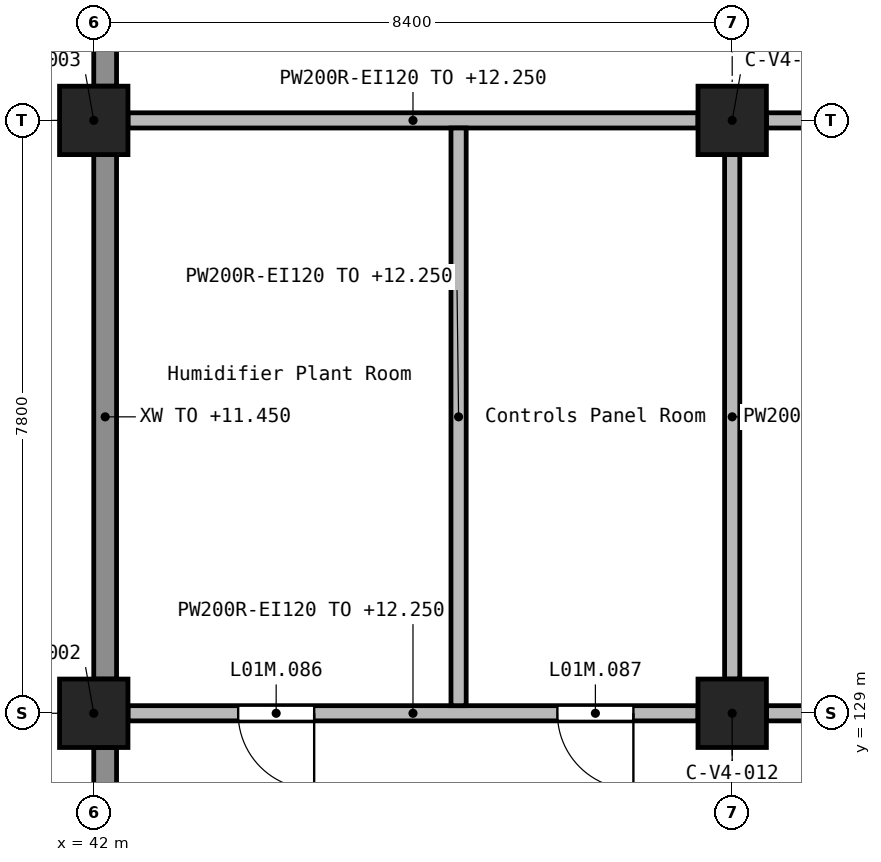
"""IFC4 building model, lengths in metres.
Left out: names, types, materials, properties, quantities, classifications, styles, units other than length and angle.
Written with IfcOpenShell. Run it as: python <this file> out.ifc"""

import sys

from ifc_helpers import new_model, si_unit, direction, frame, frame_2d, origin, origin_2d, place, context, subcontext, project, spatial, rectangle, extrude, element, fill, save


model = new_model("IFC4")
c1 = context("Model", 3, precision=1e-05, world=origin(), true_north=direction((0.0, 1.0)))
c2 = subcontext(c1, "Body", "Model", "MODEL_VIEW")
j1 = project(units=[si_unit("LENGTHUNIT", "METRE"), si_unit("PLANEANGLEUNIT", "RADIAN")], contexts=[c1])
p1 = place(None, origin())
s1 = spatial("IfcSite", under=j1, at=p1, CompositionType="ELEMENT")
p2 = place(p1, origin())
s2 = spatial("IfcBuilding", under=s1, at=p2, CompositionType="ELEMENT")
p3 = place(p2, frame((0.0, 0.0, 9.9)))
s3 = spatial("IfcBuildingStorey", under=s2, at=p3, CompositionType="ELEMENT", Elevation=9.9)
for number, where, z_axis, x_axis in (
    (1, (42.0, 129.0, 0.0), (0.0, 0.0, 1.0), (1.0, 0.0, 0.0)),
    (2, (42.0, 136.8, 0.0), (0.0, 0.0, 1.0), (1.0, 0.0, 0.0)),
    (3, (50.4, 129.0, 0.0), (0.0, 0.0, 1.0), (1.0, 0.0, 0.0)),
    (4, (50.4, 136.8, 0.0), (0.0, 0.0, 1.0), (1.0, 0.0, 0.0)),
):
    element("IfcColumn", number, at=place(p3, frame(where, z_axis=z_axis, x_axis=x_axis)), inside=s3, PredefinedType="COLUMN", context=c2, shape_type="SweptSolid", body=[
        extrude(rectangle(XDim=0.9, YDim=0.9, at=origin_2d()), origin(), (0.0, 0.0, 1.0), 2.7),
    ])
p4 = place(p3, frame((42.15, 139.95, 0.0), z_axis=(0.0, 0.0, 1.0), x_axis=(0.0, -1.0, 0.0)))
e5 = element("IfcWall", 5, at=p4, inside=s3, PredefinedType="STANDARD", context=c2, shape_type="SweptSolid", body=[
    extrude(rectangle(XDim=2.7, YDim=0.3, at=frame_2d((1.35, 0.0))), origin(), (0.0, 0.0, 1.0), 1.55),
])
p5 = place(p3, frame((42.15, 136.35, 0.0), z_axis=(0.0, 0.0, 1.0), x_axis=(0.0, -1.0, 0.0)))
e6 = element("IfcWall", 6, at=p5, inside=s3, PredefinedType="STANDARD", context=c2, shape_type="SweptSolid", body=[
    extrude(rectangle(XDim=6.9, YDim=0.3, at=frame_2d((3.45, 0.0))), origin(), (0.0, 0.0, 1.0), 1.55),
])
p6 = place(p3, frame((42.15, 128.55, 0.0), z_axis=(0.0, 0.0, 1.0), x_axis=(0.0, -1.0, 0.0)))
e7 = element("IfcWall", 7, at=p6, inside=s3, PredefinedType="STANDARD", context=c2, shape_type="SweptSolid", body=[
    extrude(rectangle(XDim=2.7, YDim=0.3, at=frame_2d((1.35, 0.0))), origin(), (0.0, 0.0, 1.0), 1.55),
])
p7 = place(p3, frame((58.35, 129.0, 0.0), z_axis=(0.0, 0.0, 1.0), x_axis=(-1.0, 0.0, 0.0)))
e8 = element("IfcWall", 8, at=p7, inside=s3, PredefinedType="SOLIDWALL", context=c2, shape_type="SweptSolid", body=[
    extrude(rectangle(XDim=7.5, YDim=0.2, at=frame_2d((3.75, 0.0))), origin(), (0.0, 0.0, 1.0), 2.35),
])
p8 = place(p7, frame((1.65, 0.0, 0.0)))
e9 = element("IfcOpeningElement", 9, at=p8, cuts=e8, PredefinedType="OPENING", context=c2, shape_type="SweptSolid", body=[
    extrude(rectangle(XDim=1.8, YDim=2.1, at=frame_2d((0.9, 1.05))), frame((0.0, 0.11, 0.0), z_axis=(0.0, -1.0, 0.0), x_axis=(1.0, 0.0, 0.0)), (0.0, 0.0, 1.0), 0.22),
])
p9 = place(p3, frame((49.95, 129.0, 0.0), z_axis=(0.0, 0.0, 1.0), x_axis=(-1.0, 0.0, 0.0)))
e10 = element("IfcWall", 10, at=p9, inside=s3, PredefinedType="SOLIDWALL", context=c2, shape_type="SweptSolid", body=[
    extrude(rectangle(XDim=7.5, YDim=0.2, at=frame_2d((3.75, 0.0))), origin(), (0.0, 0.0, 1.0), 2.35),
])
p10 = place(p9, frame((5.05, 0.0, 0.0)))
e11 = element("IfcOpeningElement", 11, at=p10, cuts=e10, PredefinedType="OPENING", context=c2, shape_type="SweptSolid", body=[
    extrude(rectangle(XDim=1.0, YDim=2.1, at=frame_2d((0.5, 1.05))), frame((0.0, 0.11, 0.0), z_axis=(0.0, -1.0, 0.0), x_axis=(1.0, 0.0, 0.0)), (0.0, 0.0, 1.0), 0.22),
])
p11 = place(p9, frame((0.85, 0.0, 0.0)))
e12 = element("IfcOpeningElement", 12, at=p11, cuts=e10, PredefinedType="OPENING", context=c2, shape_type="SweptSolid", body=[
    extrude(rectangle(XDim=1.0, YDim=2.1, at=frame_2d((0.5, 1.05))), frame((0.0, 0.11, 0.0), z_axis=(0.0, -1.0, 0.0), x_axis=(1.0, 0.0, 0.0)), (0.0, 0.0, 1.0), 0.22),
])
for number, where, z_axis, x_axis in (
    (13, (58.35, 136.8, 0.0), (0.0, 0.0, 1.0), (-1.0, 0.0, 0.0)),
    (14, (49.95, 136.8, 0.0), (0.0, 0.0, 1.0), (-1.0, 0.0, 0.0)),
):
    element("IfcWall", number, at=place(p3, frame(where, z_axis=z_axis, x_axis=x_axis)), inside=s3, PredefinedType="SOLIDWALL", context=c2, shape_type="SweptSolid", body=[
        extrude(rectangle(XDim=7.5, YDim=0.2, at=frame_2d((3.75, 0.0))), origin(), (0.0, 0.0, 1.0), 2.35),
    ])
p12 = place(p3, frame((46.8, 129.1, 0.0), z_axis=(0.0, 0.0, 1.0), x_axis=(0.0, 1.0, 0.0)))
e15 = element("IfcWall", 15, at=p12, inside=s3, PredefinedType="SOLIDWALL", context=c2, shape_type="SweptSolid", body=[
    extrude(rectangle(XDim=7.6, YDim=0.2, at=frame_2d((3.8, 0.0))), origin(), (0.0, 0.0, 1.0), 2.35),
])
p13 = place(p3, frame((50.4, 129.45, 0.0), z_axis=(0.0, 0.0, 1.0), x_axis=(0.0, 1.0, 0.0)))
e16 = element("IfcWall", 16, at=p13, inside=s3, PredefinedType="SOLIDWALL", context=c2, shape_type="SweptSolid", body=[
    extrude(rectangle(XDim=6.9, YDim=0.2, at=frame_2d((3.45, 0.0))), origin(), (0.0, 0.0, 1.0), 2.35),
])
p14 = place(p10, frame((1.0, 0.0, 0.0), z_axis=(0.0, 0.0, 1.0), x_axis=(-1.0, 0.0, 0.0)))
e17 = element("IfcDoor", 17, at=p14, inside=s3, OperationType="SINGLE_SWING_LEFT", PredefinedType="DOOR", context=c2, shape_type="SweptSolid", body=[
    extrude(rectangle(XDim=1.0, YDim=2.1, at=frame_2d((0.5, 1.05))), frame((0.0, 0.025, 0.0), z_axis=(0.0, -1.0, 0.0), x_axis=(1.0, 0.0, 0.0)), (0.0, 0.0, 1.0), 0.05),
])
fill(e11, e17)
p15 = place(p11, frame((1.0, 0.0, 0.0), z_axis=(0.0, 0.0, 1.0), x_axis=(-1.0, 0.0, 0.0)))
e18 = element("IfcDoor", 18, at=p15, inside=s3, OperationType="SINGLE_SWING_RIGHT", PredefinedType="DOOR", context=c2, shape_type="SweptSolid", body=[
    extrude(rectangle(XDim=1.0, YDim=2.1, at=frame_2d((0.5, 1.05))), frame((0.0, 0.025, 0.0), z_axis=(0.0, -1.0, 0.0), x_axis=(1.0, 0.0, 0.0)), (0.0, 0.0, 1.0), 0.05),
])
fill(e12, e18)
save(model, sys.argv[1])
